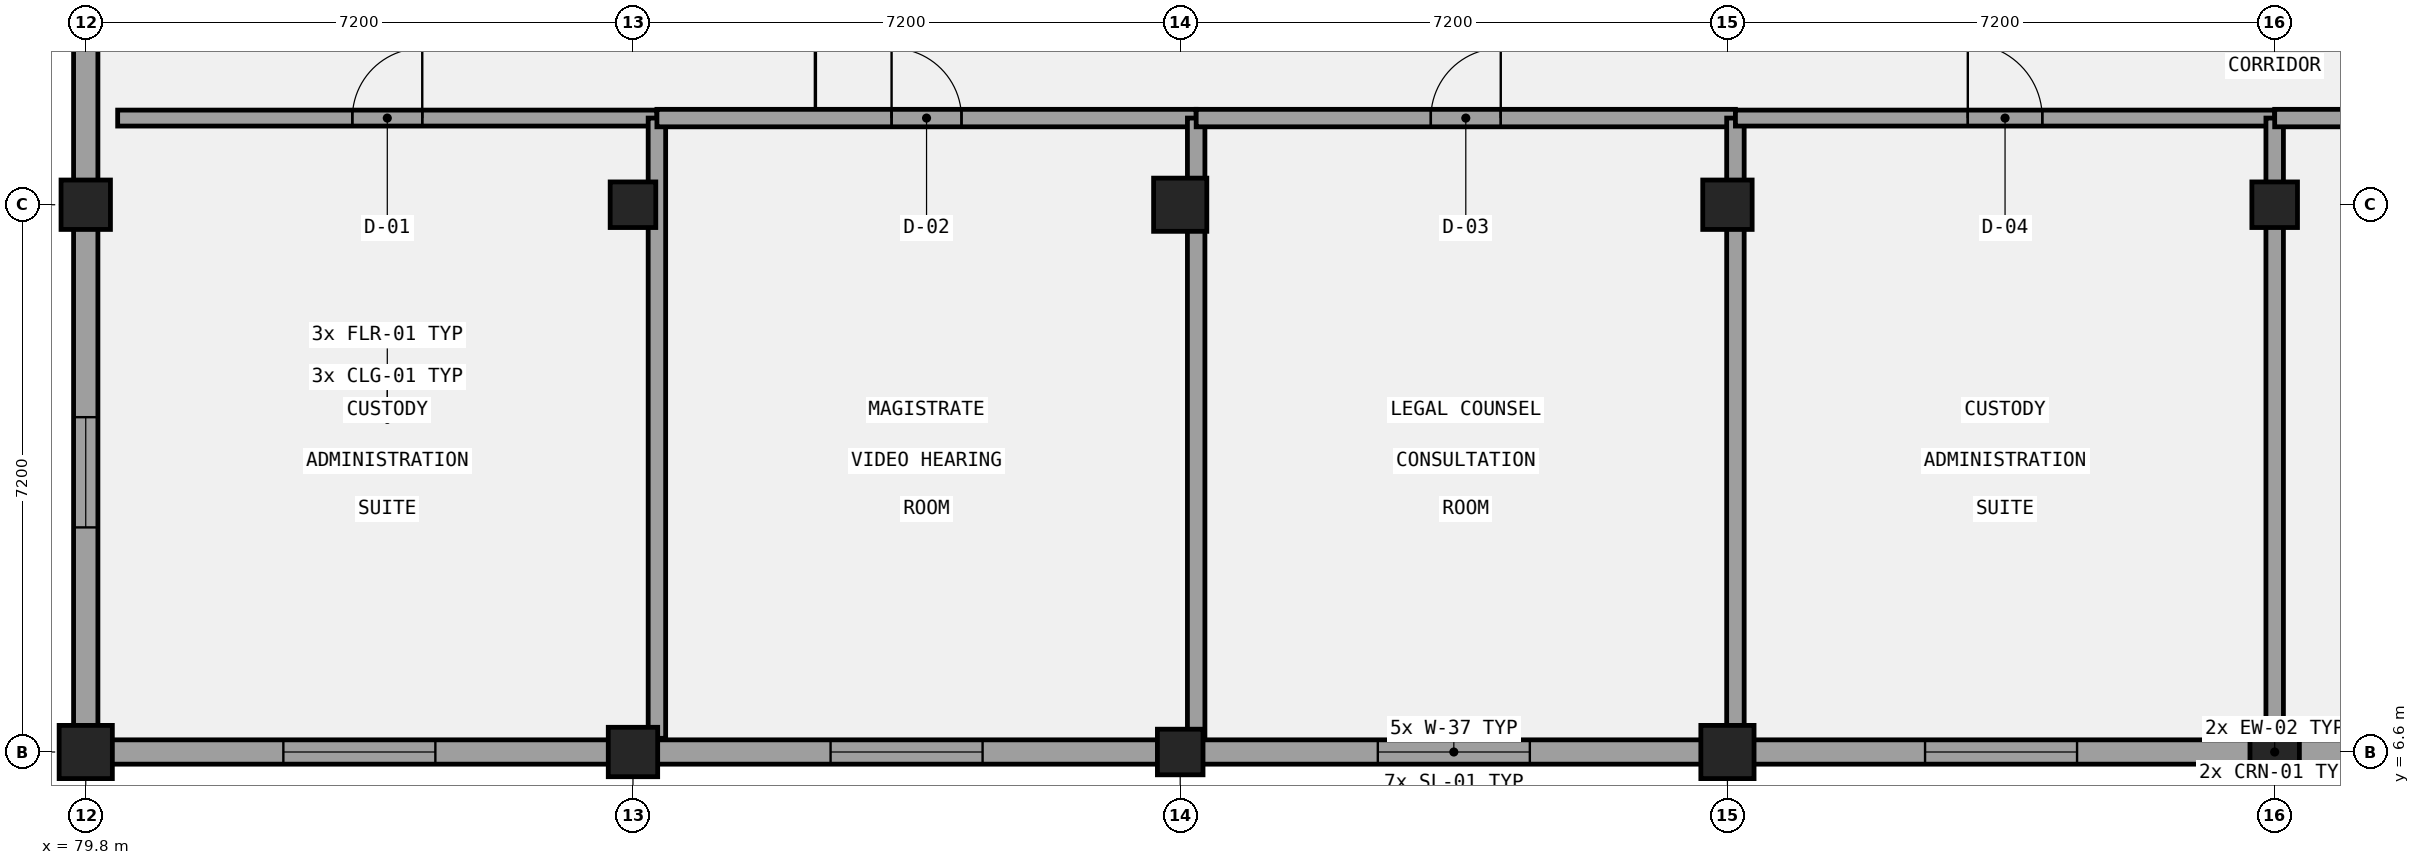
"""IFC4 building model, lengths in metres.
Left out: names, types, materials, properties, quantities, classifications, styles, units other than length and angle.
Written with IfcOpenShell. Run it as: python <this file> out.ifc"""

import sys

from ifc_helpers import new_model, si_unit, direction, frame, frame_2d, origin, origin_2d, place, context, subcontext, project, spatial, rectangle, extrude, element, fill, save


model = new_model("IFC4")
c1 = context("Model", 3, precision=1e-05, world=origin(), true_north=direction((0.0, 1.0)))
c2 = subcontext(c1, "Body", "Model", "MODEL_VIEW")
j1 = project(units=[si_unit("LENGTHUNIT", "METRE"), si_unit("PLANEANGLEUNIT", "RADIAN")], contexts=[c1])
p1 = place(None, origin())
s1 = spatial("IfcSite", under=j1, at=p1, CompositionType="ELEMENT")
p2 = place(p1, origin())
s2 = spatial("IfcBuilding", under=s1, at=p2, CompositionType="ELEMENT")
p3 = place(p2, frame((0.0, 0.0, 9.6)))
s3 = spatial("IfcBuildingStorey", under=s2, at=p3, CompositionType="ELEMENT", Elevation=9.6)
p4 = place(p3, frame((79.8, 6.6, 0.0), z_axis=(0.0, 0.0, 1.0), x_axis=(1.0, 0.0, 0.0)))
e1 = element("IfcColumn", 1, at=p4, inside=s3, PredefinedType="COLUMN", context=c2, shape_type="SweptSolid", body=[
    extrude(rectangle(XDim=0.7, YDim=0.7, at=origin_2d()), origin(), (0.0, 0.0, 1.0), 4.2),
])
for number, where, z_axis, x_axis in (
    (2, (79.8, 13.8, 0.0), (0.0, 0.0, 1.0), (1.0, 0.0, 0.0)),
    (3, (87.0, 6.6, 0.0), (0.0, 0.0, 1.0), (1.0, 0.0, 0.0)),
):
    element("IfcColumn", number, at=place(p3, frame(where, z_axis=z_axis, x_axis=x_axis)), inside=s3, PredefinedType="COLUMN", context=c2, shape_type="SweptSolid", body=[
        extrude(rectangle(XDim=0.65, YDim=0.65, at=origin_2d()), origin(), (0.0, 0.0, 1.0), 4.2),
    ])
for number, where, z_axis, x_axis in (
    (4, (87.0, 13.8, 0.0), (0.0, 0.0, 1.0), (1.0, 0.0, 0.0)),
    (5, (94.2, 6.6, 0.0), (0.0, 0.0, 1.0), (1.0, 0.0, 0.0)),
):
    element("IfcColumn", number, at=place(p3, frame(where, z_axis=z_axis, x_axis=x_axis)), inside=s3, PredefinedType="COLUMN", context=c2, shape_type="SweptSolid", body=[
        extrude(rectangle(XDim=0.6, YDim=0.6, at=origin_2d()), origin(), (0.0, 0.0, 1.0), 4.2),
    ])
for number, where, z_axis, x_axis in (
    (6, (94.2, 13.8, 0.0), (0.0, 0.0, 1.0), (1.0, 0.0, 0.0)),
    (7, (101.4, 6.6, 0.0), (0.0, 0.0, 1.0), (1.0, 0.0, 0.0)),
):
    element("IfcColumn", number, at=place(p3, frame(where, z_axis=z_axis, x_axis=x_axis)), inside=s3, PredefinedType="COLUMN", context=c2, shape_type="SweptSolid", body=[
        extrude(rectangle(XDim=0.7, YDim=0.7, at=origin_2d()), origin(), (0.0, 0.0, 1.0), 4.2),
    ])
for number, where, z_axis, x_axis in (
    (8, (101.4, 13.8, 0.0), (0.0, 0.0, 1.0), (1.0, 0.0, 0.0)),
    (9, (108.6, 6.6, 0.0), (0.0, 0.0, 1.0), (1.0, 0.0, 0.0)),
):
    element("IfcColumn", number, at=place(p3, frame(where, z_axis=z_axis, x_axis=x_axis)), inside=s3, PredefinedType="COLUMN", context=c2, shape_type="SweptSolid", body=[
        extrude(rectangle(XDim=0.65, YDim=0.65, at=origin_2d()), origin(), (0.0, 0.0, 1.0), 4.2),
    ])
p5 = place(p3, frame((108.6, 13.8, 0.0), z_axis=(0.0, 0.0, 1.0), x_axis=(1.0, 0.0, 0.0)))
e10 = element("IfcColumn", 10, at=p5, inside=s3, PredefinedType="COLUMN", context=c2, shape_type="SweptSolid", body=[
    extrude(rectangle(XDim=0.6, YDim=0.6, at=origin_2d()), origin(), (0.0, 0.0, 1.0), 4.2),
])
p6 = place(p3, frame((79.8, 28.01, 0.0), z_axis=(0.0, 0.0, 1.0), x_axis=(0.0, -1.0, 0.0)))
e11 = element("IfcWall", 11, at=p6, inside=s3, PredefinedType="SOLIDWALL", context=c2, shape_type="SweptSolid", body=[
    extrude(rectangle(XDim=21.25, YDim=0.32, at=frame_2d((10.625, 0.0))), origin(), (0.0, 0.0, 1.0), 3.19),
])
p7 = place(p6, frame((17.005, 0.0, 1.0)))
e12 = element("IfcOpeningElement", 12, at=p7, cuts=e11, PredefinedType="OPENING", context=c2, shape_type="SweptSolid", body=[
    extrude(rectangle(XDim=1.45, YDim=1.9, at=frame_2d((0.725, 0.95))), frame((0.0, 0.17, 0.0), z_axis=(0.0, -1.0, 0.0), x_axis=(1.0, 0.0, 0.0)), (0.0, 0.0, 1.0), 0.34),
])
p8 = place(p6, frame((9.885, 0.0, 1.0)))
e13 = element("IfcOpeningElement", 13, at=p8, cuts=e11, PredefinedType="OPENING", context=c2, shape_type="SweptSolid", body=[
    extrude(rectangle(XDim=1.45, YDim=1.9, at=frame_2d((0.725, 0.95))), frame((0.0, 0.17, 0.0), z_axis=(0.0, -1.0, 0.0), x_axis=(1.0, 0.0, 0.0)), (0.0, 0.0, 1.0), 0.34),
])
p9 = place(p6, frame((2.78, 0.0, 1.0)))
e14 = element("IfcOpeningElement", 14, at=p9, cuts=e11, PredefinedType="OPENING", context=c2, shape_type="SweptSolid", body=[
    extrude(rectangle(XDim=1.45, YDim=1.9, at=frame_2d((0.725, 0.95))), frame((0.0, 0.17, 0.0), z_axis=(0.0, -1.0, 0.0), x_axis=(1.0, 0.0, 0.0)), (0.0, 0.0, 1.0), 0.34),
])
p10 = place(p3, frame((79.64, 6.6, 0.0), z_axis=(0.0, 0.0, 1.0), x_axis=(1.0, 0.0, 0.0)))
e15 = element("IfcWall", 15, at=p10, inside=s3, PredefinedType="SOLIDWALL", context=c2, shape_type="SweptSolid", body=[
    extrude(rectangle(XDim=57.92, YDim=0.32, at=frame_2d((28.96, 0.0))), origin(), (0.0, 0.0, 1.0), 2.94),
])
p11 = place(p10, frame((2.76, 0.0, 1.0)))
e16 = element("IfcOpeningElement", 16, at=p11, cuts=e15, PredefinedType="OPENING", context=c2, shape_type="SweptSolid", body=[
    extrude(rectangle(XDim=2.0, YDim=1.65, at=frame_2d((1.0, 0.825))), frame((0.0, 0.17, 0.0), z_axis=(0.0, -1.0, 0.0), x_axis=(1.0, 0.0, 0.0)), (0.0, 0.0, 1.0), 0.34),
])
p12 = place(p10, frame((9.96, 0.0, 1.0)))
e17 = element("IfcOpeningElement", 17, at=p12, cuts=e15, PredefinedType="OPENING", context=c2, shape_type="SweptSolid", body=[
    extrude(rectangle(XDim=2.0, YDim=1.65, at=frame_2d((1.0, 0.825))), frame((0.0, 0.17, 0.0), z_axis=(0.0, -1.0, 0.0), x_axis=(1.0, 0.0, 0.0)), (0.0, 0.0, 1.0), 0.34),
])
p13 = place(p10, frame((17.16, 0.0, 1.0)))
e18 = element("IfcOpeningElement", 18, at=p13, cuts=e15, PredefinedType="OPENING", context=c2, shape_type="SweptSolid", body=[
    extrude(rectangle(XDim=2.0, YDim=1.65, at=frame_2d((1.0, 0.825))), frame((0.0, 0.17, 0.0), z_axis=(0.0, -1.0, 0.0), x_axis=(1.0, 0.0, 0.0)), (0.0, 0.0, 1.0), 0.34),
])
p14 = place(p10, frame((24.36, 0.0, 1.0)))
e19 = element("IfcOpeningElement", 19, at=p14, cuts=e15, PredefinedType="OPENING", context=c2, shape_type="SweptSolid", body=[
    extrude(rectangle(XDim=2.0, YDim=1.65, at=frame_2d((1.0, 0.825))), frame((0.0, 0.17, 0.0), z_axis=(0.0, -1.0, 0.0), x_axis=(1.0, 0.0, 0.0)), (0.0, 0.0, 1.0), 0.34),
])
p15 = place(p10, frame((31.56, 0.0, 1.0)))
e20 = element("IfcOpeningElement", 20, at=p15, cuts=e15, PredefinedType="OPENING", context=c2, shape_type="SweptSolid", body=[
    extrude(rectangle(XDim=2.0, YDim=1.65, at=frame_2d((1.0, 0.825))), frame((0.0, 0.17, 0.0), z_axis=(0.0, -1.0, 0.0), x_axis=(1.0, 0.0, 0.0)), (0.0, 0.0, 1.0), 0.34),
])
p16 = place(p10, frame((38.76, 0.0, 1.0)))
e21 = element("IfcOpeningElement", 21, at=p16, cuts=e15, PredefinedType="OPENING", context=c2, shape_type="SweptSolid", body=[
    extrude(rectangle(XDim=2.0, YDim=1.65, at=frame_2d((1.0, 0.825))), frame((0.0, 0.17, 0.0), z_axis=(0.0, -1.0, 0.0), x_axis=(1.0, 0.0, 0.0)), (0.0, 0.0, 1.0), 0.34),
])
p17 = place(p10, frame((45.96, 0.0, 1.0)))
e22 = element("IfcOpeningElement", 22, at=p17, cuts=e15, PredefinedType="OPENING", context=c2, shape_type="SweptSolid", body=[
    extrude(rectangle(XDim=2.0, YDim=1.65, at=frame_2d((1.0, 0.825))), frame((0.0, 0.17, 0.0), z_axis=(0.0, -1.0, 0.0), x_axis=(1.0, 0.0, 0.0)), (0.0, 0.0, 1.0), 0.34),
])
p18 = place(p10, frame((53.16, 0.0, 1.0)))
e23 = element("IfcOpeningElement", 23, at=p18, cuts=e15, PredefinedType="OPENING", context=c2, shape_type="SweptSolid", body=[
    extrude(rectangle(XDim=2.0, YDim=1.65, at=frame_2d((1.0, 0.825))), frame((0.0, 0.17, 0.0), z_axis=(0.0, -1.0, 0.0), x_axis=(1.0, 0.0, 0.0)), (0.0, 0.0, 1.0), 0.34),
])
p19 = place(p3, frame((80.22, 14.94, 0.0), z_axis=(0.0, 0.0, 1.0), x_axis=(1.0, 0.0, 0.0)))
e24 = element("IfcWall", 24, at=p19, inside=s3, PredefinedType="PARTITIONING", context=c2, shape_type="SweptSolid", body=[
    extrude(rectangle(XDim=7.095, YDim=0.21, at=frame_2d((3.547, 0.0))), origin(), (0.0, 0.0, 1.0), 3.94),
])
p20 = place(p19, frame((3.087, 0.0, 0.0)))
e25 = element("IfcOpeningElement", 25, at=p20, cuts=e24, PredefinedType="OPENING", context=c2, shape_type="SweptSolid", body=[
    extrude(rectangle(XDim=0.92, YDim=2.1, at=frame_2d((0.46, 1.05))), frame((0.0, 0.115, 0.0), z_axis=(0.0, -1.0, 0.0), x_axis=(1.0, 0.0, 0.0)), (0.0, 0.0, 1.0), 0.23),
])
p21 = place(p3, frame((87.315, 6.78, 0.0), z_axis=(0.0, 0.0, 1.0), x_axis=(0.0, 1.0, 0.0)))
e26 = element("IfcWall", 26, at=p21, inside=s3, PredefinedType="PARTITIONING", context=c2, shape_type="SweptSolid", body=[
    extrude(rectangle(XDim=8.16, YDim=0.23, at=frame_2d((4.08, 0.0))), origin(), (0.0, 0.0, 1.0), 3.19),
])
p22 = place(p3, frame((87.315, 14.94, 0.0), z_axis=(0.0, 0.0, 1.0), x_axis=(1.0, 0.0, 0.0)))
e27 = element("IfcWall", 27, at=p22, inside=s3, PredefinedType="PARTITIONING", context=c2, shape_type="SweptSolid", body=[
    extrude(rectangle(XDim=7.095, YDim=0.23, at=frame_2d((3.547, 0.0))), origin(), (0.0, 0.0, 1.0), 3.94),
])
p23 = place(p22, frame((3.087, 0.0, 0.0)))
e28 = element("IfcOpeningElement", 28, at=p23, cuts=e27, PredefinedType="OPENING", context=c2, shape_type="SweptSolid", body=[
    extrude(rectangle(XDim=0.92, YDim=2.22, at=frame_2d((0.46, 1.11))), frame((0.0, 0.125, 0.0), z_axis=(0.0, -1.0, 0.0), x_axis=(1.0, 0.0, 0.0)), (0.0, 0.0, 1.0), 0.25),
])
p24 = place(p3, frame((94.41, 6.78, 0.0), z_axis=(0.0, 0.0, 1.0), x_axis=(0.0, 1.0, 0.0)))
e29 = element("IfcWall", 29, at=p24, inside=s3, PredefinedType="PARTITIONING", context=c2, shape_type="SweptSolid", body=[
    extrude(rectangle(XDim=8.16, YDim=0.23, at=frame_2d((4.08, 0.0))), origin(), (0.0, 0.0, 1.0), 3.19),
])
p25 = place(p3, frame((94.41, 14.94, 0.0), z_axis=(0.0, 0.0, 1.0), x_axis=(1.0, 0.0, 0.0)))
e30 = element("IfcWall", 30, at=p25, inside=s3, PredefinedType="PARTITIONING", context=c2, shape_type="SweptSolid", body=[
    extrude(rectangle(XDim=7.095, YDim=0.23, at=frame_2d((3.547, 0.0))), origin(), (0.0, 0.0, 1.0), 3.94),
])
p26 = place(p25, frame((3.087, 0.0, 0.0)))
e31 = element("IfcOpeningElement", 31, at=p26, cuts=e30, PredefinedType="OPENING", context=c2, shape_type="SweptSolid", body=[
    extrude(rectangle(XDim=0.92, YDim=2.35, at=frame_2d((0.46, 1.175))), frame((0.0, 0.125, 0.0), z_axis=(0.0, -1.0, 0.0), x_axis=(1.0, 0.0, 0.0)), (0.0, 0.0, 1.0), 0.25),
])
p27 = place(p3, frame((101.505, 6.78, 0.0), z_axis=(0.0, 0.0, 1.0), x_axis=(0.0, 1.0, 0.0)))
e32 = element("IfcWall", 32, at=p27, inside=s3, PredefinedType="PARTITIONING", context=c2, shape_type="SweptSolid", body=[
    extrude(rectangle(XDim=8.16, YDim=0.23, at=frame_2d((4.08, 0.0))), origin(), (0.0, 0.0, 1.0), 3.14),
])
p28 = place(p3, frame((101.505, 14.94, 0.0), z_axis=(0.0, 0.0, 1.0), x_axis=(1.0, 0.0, 0.0)))
e33 = element("IfcWall", 33, at=p28, inside=s3, PredefinedType="PARTITIONING", context=c2, shape_type="SweptSolid", body=[
    extrude(rectangle(XDim=7.095, YDim=0.21, at=frame_2d((3.548, 0.0))), origin(), (0.0, 0.0, 1.0), 3.94),
])
p29 = place(p28, frame((3.058, 0.0, 0.0)))
e34 = element("IfcOpeningElement", 34, at=p29, cuts=e33, PredefinedType="OPENING", context=c2, shape_type="SweptSolid", body=[
    extrude(rectangle(XDim=0.98, YDim=2.1, at=frame_2d((0.49, 1.05))), frame((0.0, 0.115, 0.0), z_axis=(0.0, -1.0, 0.0), x_axis=(1.0, 0.0, 0.0)), (0.0, 0.0, 1.0), 0.23),
])
p30 = place(p3, frame((108.6, 6.78, 0.0), z_axis=(0.0, 0.0, 1.0), x_axis=(0.0, 1.0, 0.0)))
e35 = element("IfcWall", 35, at=p30, inside=s3, PredefinedType="PARTITIONING", context=c2, shape_type="SweptSolid", body=[
    extrude(rectangle(XDim=8.16, YDim=0.23, at=frame_2d((4.08, 0.0))), origin(), (0.0, 0.0, 1.0), 3.09),
])
p31 = place(p3, frame((108.6, 14.94, 0.0), z_axis=(0.0, 0.0, 1.0), x_axis=(1.0, 0.0, 0.0)))
e36 = element("IfcWall", 36, at=p31, inside=s3, PredefinedType="PARTITIONING", context=c2, shape_type="SweptSolid", body=[
    extrude(rectangle(XDim=7.095, YDim=0.23, at=frame_2d((3.547, 0.0))), origin(), (0.0, 0.0, 1.0), 3.94),
])
p32 = place(p31, frame((3.058, 0.0, 0.0)))
e37 = element("IfcOpeningElement", 37, at=p32, cuts=e36, PredefinedType="OPENING", context=c2, shape_type="SweptSolid", body=[
    extrude(rectangle(XDim=0.98, YDim=2.22, at=frame_2d((0.49, 1.11))), frame((0.0, 0.125, 0.0), z_axis=(0.0, -1.0, 0.0), x_axis=(1.0, 0.0, 0.0)), (0.0, 0.0, 1.0), 0.25),
])
p33 = place(p7, origin())
e38 = element("IfcWindow", 38, at=p33, inside=s3, PartitioningType="SINGLE_PANEL", PredefinedType="WINDOW", context=c2, shape_type="SweptSolid", body=[
    extrude(rectangle(XDim=1.45, YDim=1.9, at=frame_2d((0.725, 0.95))), frame((0.0, 0.03, 0.0), z_axis=(0.0, -1.0, 0.0), x_axis=(1.0, 0.0, 0.0)), (0.0, 0.0, 1.0), 0.06),
])
fill(e12, e38)
p34 = place(p11, origin())
e39 = element("IfcWindow", 39, at=p34, inside=s3, PartitioningType="SINGLE_PANEL", PredefinedType="WINDOW", context=c2, shape_type="SweptSolid", body=[
    extrude(rectangle(XDim=2.0, YDim=1.65, at=frame_2d((1.0, 0.825))), frame((0.0, 0.03, 0.0), z_axis=(0.0, -1.0, 0.0), x_axis=(1.0, 0.0, 0.0)), (0.0, 0.0, 1.0), 0.06),
])
fill(e16, e39)
p35 = place(p12, origin())
e40 = element("IfcWindow", 40, at=p35, inside=s3, PartitioningType="SINGLE_PANEL", PredefinedType="WINDOW", context=c2, shape_type="SweptSolid", body=[
    extrude(rectangle(XDim=2.0, YDim=1.65, at=frame_2d((1.0, 0.825))), frame((0.0, 0.03, 0.0), z_axis=(0.0, -1.0, 0.0), x_axis=(1.0, 0.0, 0.0)), (0.0, 0.0, 1.0), 0.06),
])
fill(e17, e40)
p36 = place(p13, origin())
e41 = element("IfcWindow", 41, at=p36, inside=s3, PartitioningType="SINGLE_PANEL", PredefinedType="WINDOW", context=c2, shape_type="SweptSolid", body=[
    extrude(rectangle(XDim=2.0, YDim=1.65, at=frame_2d((1.0, 0.825))), frame((0.0, 0.03, 0.0), z_axis=(0.0, -1.0, 0.0), x_axis=(1.0, 0.0, 0.0)), (0.0, 0.0, 1.0), 0.06),
])
fill(e18, e41)
p37 = place(p14, origin())
e42 = element("IfcWindow", 42, at=p37, inside=s3, PartitioningType="SINGLE_PANEL", PredefinedType="WINDOW", context=c2, shape_type="SweptSolid", body=[
    extrude(rectangle(XDim=2.0, YDim=1.65, at=frame_2d((1.0, 0.825))), frame((0.0, 0.03, 0.0), z_axis=(0.0, -1.0, 0.0), x_axis=(1.0, 0.0, 0.0)), (0.0, 0.0, 1.0), 0.06),
])
fill(e19, e42)
p38 = place(p20, frame((0.92, 0.0, 0.0), z_axis=(0.0, 0.0, 1.0), x_axis=(-1.0, 0.0, 0.0)))
e43 = element("IfcDoor", 43, at=p38, inside=s3, OperationType="SINGLE_SWING_RIGHT", PredefinedType="DOOR", context=c2, shape_type="SweptSolid", body=[
    extrude(rectangle(XDim=0.92, YDim=2.1, at=frame_2d((0.46, 1.05))), frame((0.0, 0.025, 0.0), z_axis=(0.0, -1.0, 0.0), x_axis=(1.0, 0.0, 0.0)), (0.0, 0.0, 1.0), 0.05),
])
fill(e25, e43)
p39 = place(p23, frame((0.92, 0.0, 0.0), z_axis=(0.0, 0.0, 1.0), x_axis=(-1.0, 0.0, 0.0)))
e44 = element("IfcDoor", 44, at=p39, inside=s3, OperationType="SINGLE_SWING_LEFT", PredefinedType="DOOR", context=c2, shape_type="SweptSolid", body=[
    extrude(rectangle(XDim=0.92, YDim=2.22, at=frame_2d((0.46, 1.11))), frame((0.0, 0.025, 0.0), z_axis=(0.0, -1.0, 0.0), x_axis=(1.0, 0.0, 0.0)), (0.0, 0.0, 1.0), 0.05),
])
fill(e28, e44)
p40 = place(p26, frame((0.92, 0.0, 0.0), z_axis=(0.0, 0.0, 1.0), x_axis=(-1.0, 0.0, 0.0)))
e45 = element("IfcDoor", 45, at=p40, inside=s3, OperationType="SINGLE_SWING_RIGHT", PredefinedType="DOOR", context=c2, shape_type="SweptSolid", body=[
    extrude(rectangle(XDim=0.92, YDim=2.35, at=frame_2d((0.46, 1.175))), frame((0.0, 0.025, 0.0), z_axis=(0.0, -1.0, 0.0), x_axis=(1.0, 0.0, 0.0)), (0.0, 0.0, 1.0), 0.05),
])
fill(e31, e45)
p41 = place(p29, frame((0.98, 0.0, 0.0), z_axis=(0.0, 0.0, 1.0), x_axis=(-1.0, 0.0, 0.0)))
e46 = element("IfcDoor", 46, at=p41, inside=s3, OperationType="SINGLE_SWING_LEFT", PredefinedType="DOOR", context=c2, shape_type="SweptSolid", body=[
    extrude(rectangle(XDim=0.98, YDim=2.1, at=frame_2d((0.49, 1.05))), frame((0.0, 0.025, 0.0), z_axis=(0.0, -1.0, 0.0), x_axis=(1.0, 0.0, 0.0)), (0.0, 0.0, 1.0), 0.05),
])
fill(e34, e46)
save(model, sys.argv[1])
